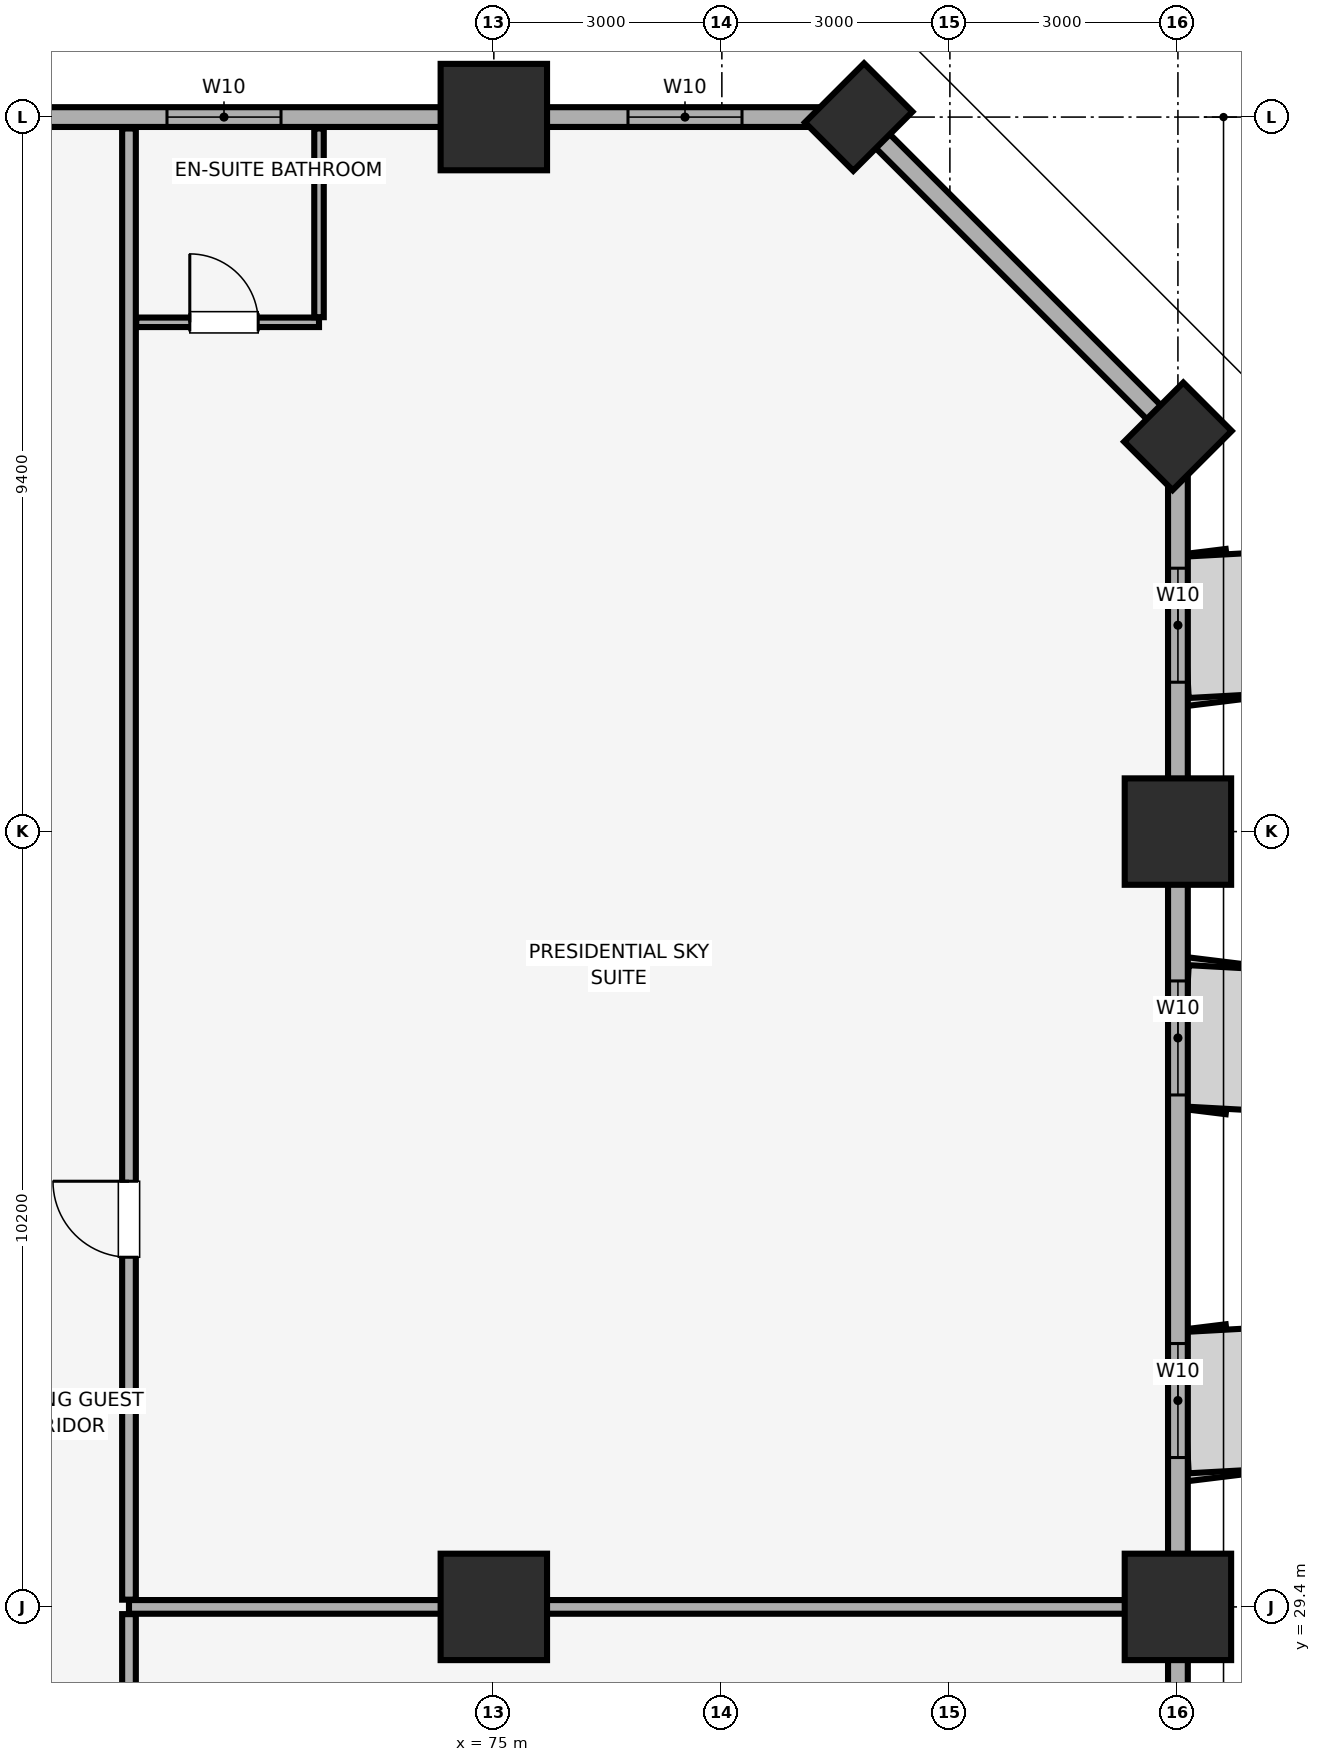
"""IFC4 building model, lengths in metres.
Left out: names, types, materials, properties, quantities, classifications, styles, units other than length and angle.
Written with IfcOpenShell. Run it as: python <this file> out.ifc"""

import sys

from ifc_helpers import new_model, si_unit, direction, frame, frame_2d, origin, origin_2d, place, context, subcontext, project, spatial, rectangle, extrude, element, fill, save


model = new_model("IFC4")
c1 = context("Model", 3, precision=1e-05, world=origin(), true_north=direction((0.0, 1.0)))
c2 = subcontext(c1, "Body", "Model", "MODEL_VIEW")
j1 = project(units=[si_unit("LENGTHUNIT", "METRE"), si_unit("PLANEANGLEUNIT", "RADIAN")], contexts=[c1])
p1 = place(None, origin())
s1 = spatial("IfcSite", under=j1, at=p1, CompositionType="ELEMENT")
p2 = place(p1, origin())
s2 = spatial("IfcBuilding", under=s1, at=p2, CompositionType="ELEMENT")
p3 = place(p2, frame((0.0, 0.0, 57.65)))
s3 = spatial("IfcBuildingStorey", under=s2, at=p3, CompositionType="ELEMENT", Elevation=57.65)
for number, where, z_axis, x_axis in (
    (1, (84.0, 29.4, 0.0), (0.0, 0.0, 1.0), (1.0, 0.0, 0.0)),
    (2, (84.0, 39.6, 0.0), (0.0, 0.0, 1.0), (1.0, 0.0, 0.0)),
):
    element("IfcColumn", number, at=place(p3, frame(where, z_axis=z_axis, x_axis=x_axis)), inside=s3, PredefinedType="COLUMN", context=c2, shape_type="SweptSolid", body=[
        extrude(rectangle(XDim=1.4, YDim=1.4, at=origin_2d()), origin(), (0.0, 0.0, 1.0), 3.51),
    ])
for number, where, z_axis, x_axis in (
    (3, (84.0, 44.8, 0.0), (0.0, 0.0, 1.0), (0.707, 0.707, 0.0)),
    (4, (79.8, 49.0, 0.0), (0.0, 0.0, 1.0), (0.707, 0.707, 0.0)),
):
    element("IfcColumn", number, at=place(p3, frame(where, z_axis=z_axis, x_axis=x_axis)), inside=s3, PredefinedType="PILASTER", context=c2, shape_type="SweptSolid", body=[
        extrude(rectangle(XDim=1.1, YDim=0.9, at=origin_2d()), origin(), (0.0, 0.0, 1.0), 3.51),
    ])
for number, where, z_axis, x_axis in (
    (5, (75.0, 29.4, 0.0), (0.0, 0.0, 1.0), (1.0, 0.0, 0.0)),
    (6, (75.0, 49.0, 0.0), (0.0, 0.0, 1.0), (1.0, 0.0, 0.0)),
):
    element("IfcColumn", number, at=place(p3, frame(where, z_axis=z_axis, x_axis=x_axis)), inside=s3, PredefinedType="COLUMN", context=c2, shape_type="SweptSolid", body=[
        extrude(rectangle(XDim=1.4, YDim=1.4, at=origin_2d()), origin(), (0.0, 0.0, 1.0), 3.51),
    ])
p4 = place(p3, frame((84.0, 4.2, 0.0), z_axis=(0.0, 0.0, 1.0), x_axis=(0.0, 1.0, 0.0)))
e7 = element("IfcWall", 7, at=p4, inside=s3, PredefinedType="SOLIDWALL", context=c2, shape_type="SweptSolid", body=[
    extrude(rectangle(XDim=40.6, YDim=0.26, at=frame_2d((20.3, 0.0))), origin(), (0.0, 0.0, 1.0), 2.56),
])
p5 = place(p4, frame((4.55, 0.0, 0.85)))
e8 = element("IfcOpeningElement", 8, at=p5, cuts=e7, PredefinedType="OPENING", context=c2, shape_type="SweptSolid", body=[
    extrude(rectangle(XDim=1.5, YDim=1.4, at=frame_2d((0.75, 0.7))), frame((0.0, 0.14, 0.0), z_axis=(0.0, -1.0, 0.0), x_axis=(1.0, 0.0, 0.0)), (0.0, 0.0, 1.0), 0.28),
])
p6 = place(p4, frame((13.46, 0.0, 0.85)))
e9 = element("IfcOpeningElement", 9, at=p6, cuts=e7, PredefinedType="OPENING", context=c2, shape_type="SweptSolid", body=[
    extrude(rectangle(XDim=1.5, YDim=1.4, at=frame_2d((0.75, 0.7))), frame((0.0, 0.14, 0.0), z_axis=(0.0, -1.0, 0.0), x_axis=(1.0, 0.0, 0.0)), (0.0, 0.0, 1.0), 0.28),
])
p7 = place(p4, frame((20.26, 0.0, 0.85)))
e10 = element("IfcOpeningElement", 10, at=p7, cuts=e7, PredefinedType="OPENING", context=c2, shape_type="SweptSolid", body=[
    extrude(rectangle(XDim=1.5, YDim=1.4, at=frame_2d((0.75, 0.7))), frame((0.0, 0.14, 0.0), z_axis=(0.0, -1.0, 0.0), x_axis=(1.0, 0.0, 0.0)), (0.0, 0.0, 1.0), 0.28),
])
p8 = place(p4, frame((27.165, 0.0, 0.85)))
e11 = element("IfcOpeningElement", 11, at=p8, cuts=e7, PredefinedType="OPENING", context=c2, shape_type="SweptSolid", body=[
    extrude(rectangle(XDim=1.5, YDim=1.4, at=frame_2d((0.75, 0.7))), frame((0.0, 0.14, 0.0), z_axis=(0.0, -1.0, 0.0), x_axis=(1.0, 0.0, 0.0)), (0.0, 0.0, 1.0), 0.28),
])
p9 = place(p4, frame((31.935, 0.0, 0.85)))
e12 = element("IfcOpeningElement", 12, at=p9, cuts=e7, PredefinedType="OPENING", context=c2, shape_type="SweptSolid", body=[
    extrude(rectangle(XDim=1.5, YDim=1.4, at=frame_2d((0.75, 0.7))), frame((0.0, 0.14, 0.0), z_axis=(0.0, -1.0, 0.0), x_axis=(1.0, 0.0, 0.0)), (0.0, 0.0, 1.0), 0.28),
])
p10 = place(p4, frame((37.365, 0.0, 0.85)))
e13 = element("IfcOpeningElement", 13, at=p10, cuts=e7, PredefinedType="OPENING", context=c2, shape_type="SweptSolid", body=[
    extrude(rectangle(XDim=1.5, YDim=1.4, at=frame_2d((0.75, 0.7))), frame((0.0, 0.14, 0.0), z_axis=(0.0, -1.0, 0.0), x_axis=(1.0, 0.0, 0.0)), (0.0, 0.0, 1.0), 0.28),
])
p11 = place(p3, frame((84.0, 44.8, 0.0), z_axis=(0.0, 0.0, 1.0), x_axis=(-0.707106781187, 0.707106781187, 0.0)))
e14 = element("IfcWall", 14, at=p11, inside=s3, PredefinedType="SOLIDWALL", context=c2, shape_type="SweptSolid", body=[
    extrude(rectangle(XDim=5.94, YDim=0.26, at=frame_2d((2.97, 0.0))), origin(), (0.0, 0.0, 1.0), 2.56),
])
p12 = place(p3, frame((79.8, 49.0, 0.0), z_axis=(0.0, 0.0, 1.0), x_axis=(-1.0, 0.0, 0.0)))
e15 = element("IfcWall", 15, at=p12, inside=s3, PredefinedType="SOLIDWALL", context=c2, shape_type="SweptSolid", body=[
    extrude(rectangle(XDim=75.6, YDim=0.26, at=frame_2d((37.8, 0.0))), origin(), (0.0, 0.0, 1.0), 2.56),
])
p13 = place(p12, frame((72.565, 0.0, 0.85)))
e16 = element("IfcOpeningElement", 16, at=p13, cuts=e15, PredefinedType="OPENING", context=c2, shape_type="SweptSolid", body=[
    extrude(rectangle(XDim=1.5, YDim=1.4, at=frame_2d((0.75, 0.7))), frame((0.0, 0.14, 0.0), z_axis=(0.0, -1.0, 0.0), x_axis=(1.0, 0.0, 0.0)), (0.0, 0.0, 1.0), 0.28),
])
p14 = place(p12, frame((67.45, 0.0, 0.85)))
e17 = element("IfcOpeningElement", 17, at=p14, cuts=e15, PredefinedType="OPENING", context=c2, shape_type="SweptSolid", body=[
    extrude(rectangle(XDim=1.5, YDim=1.4, at=frame_2d((0.75, 0.7))), frame((0.0, 0.14, 0.0), z_axis=(0.0, -1.0, 0.0), x_axis=(1.0, 0.0, 0.0)), (0.0, 0.0, 1.0), 0.28),
])
p15 = place(p12, frame((7.6, 0.0, 0.85)))
e18 = element("IfcOpeningElement", 18, at=p15, cuts=e15, PredefinedType="OPENING", context=c2, shape_type="SweptSolid", body=[
    extrude(rectangle(XDim=1.5, YDim=1.4, at=frame_2d((0.75, 0.7))), frame((0.0, 0.14, 0.0), z_axis=(0.0, -1.0, 0.0), x_axis=(1.0, 0.0, 0.0)), (0.0, 0.0, 1.0), 0.28),
])
p16 = place(p12, frame((1.535, 0.0, 0.85)))
e19 = element("IfcOpeningElement", 19, at=p16, cuts=e15, PredefinedType="OPENING", context=c2, shape_type="SweptSolid", body=[
    extrude(rectangle(XDim=1.5, YDim=1.4, at=frame_2d((0.75, 0.7))), frame((0.0, 0.14, 0.0), z_axis=(0.0, -1.0, 0.0), x_axis=(1.0, 0.0, 0.0)), (0.0, 0.0, 1.0), 0.28),
])
p17 = place(p12, frame((52.265, 0.0, 0.9)))
e20 = element("IfcOpeningElement", 20, at=p17, cuts=e15, PredefinedType="OPENING", context=c2, shape_type="SweptSolid", body=[
    extrude(rectangle(XDim=1.5, YDim=1.4, at=frame_2d((0.75, 0.7))), frame((0.0, 0.14, 0.0), z_axis=(0.0, -1.0, 0.0), x_axis=(1.0, 0.0, 0.0)), (0.0, 0.0, 1.0), 0.28),
])
p18 = place(p12, frame((45.5, 0.0, 0.9)))
e21 = element("IfcOpeningElement", 21, at=p18, cuts=e15, PredefinedType="OPENING", context=c2, shape_type="SweptSolid", body=[
    extrude(rectangle(XDim=1.5, YDim=1.4, at=frame_2d((0.75, 0.7))), frame((0.0, 0.14, 0.0), z_axis=(0.0, -1.0, 0.0), x_axis=(1.0, 0.0, 0.0)), (0.0, 0.0, 1.0), 0.28),
])
p19 = place(p12, frame((31.05, 0.0, 0.9)))
e22 = element("IfcOpeningElement", 22, at=p19, cuts=e15, PredefinedType="OPENING", context=c2, shape_type="SweptSolid", body=[
    extrude(rectangle(XDim=1.5, YDim=1.4, at=frame_2d((0.75, 0.7))), frame((0.0, 0.14, 0.0), z_axis=(0.0, -1.0, 0.0), x_axis=(1.0, 0.0, 0.0)), (0.0, 0.0, 1.0), 0.28),
])
p20 = place(p12, frame((27.85, 0.0, 0.9)))
e23 = element("IfcOpeningElement", 23, at=p20, cuts=e15, PredefinedType="OPENING", context=c2, shape_type="SweptSolid", body=[
    extrude(rectangle(XDim=1.5, YDim=1.4, at=frame_2d((0.75, 0.7))), frame((0.0, 0.14, 0.0), z_axis=(0.0, -1.0, 0.0), x_axis=(1.0, 0.0, 0.0)), (0.0, 0.0, 1.0), 0.28),
])
p21 = place(p12, frame((23.485, 0.0, 0.9)))
e24 = element("IfcOpeningElement", 24, at=p21, cuts=e15, PredefinedType="OPENING", context=c2, shape_type="SweptSolid", body=[
    extrude(rectangle(XDim=1.5, YDim=1.4, at=frame_2d((0.75, 0.7))), frame((0.0, 0.14, 0.0), z_axis=(0.0, -1.0, 0.0), x_axis=(1.0, 0.0, 0.0)), (0.0, 0.0, 1.0), 0.28),
])
p22 = place(p3, frame((70.2, 29.4, 0.0), z_axis=(0.0, 0.0, 1.0), x_axis=(1.0, 0.0, 0.0)))
e25 = element("IfcWall", 25, at=p22, inside=s3, PredefinedType="PARTITIONING", context=c2, shape_type="SweptSolid", body=[
    extrude(rectangle(XDim=13.65, YDim=0.18, at=frame_2d((6.825, 0.0))), origin(), (0.0, 0.0, 1.0), 2.86),
])
p23 = place(p3, frame((70.2, 21.515, 0.0), z_axis=(0.0, 0.0, 1.0), x_axis=(0.0, 1.0, 0.0)))
e26 = element("IfcWall", 26, at=p23, inside=s3, PredefinedType="PARTITIONING", context=c2, shape_type="SweptSolid", body=[
    extrude(rectangle(XDim=7.79, YDim=0.18, at=frame_2d((3.895, 0.0))), origin(), (0.0, 0.0, 1.0), 3.51),
])
p24 = place(p23, frame((4.49, 0.0, 0.0)))
e27 = element("IfcOpeningElement", 27, at=p24, cuts=e26, PredefinedType="OPENING", context=c2, shape_type="SweptSolid", body=[
    extrude(rectangle(XDim=1.0, YDim=2.15, at=frame_2d((0.5, 1.075))), frame((0.0, 0.1, 0.0), z_axis=(0.0, -1.0, 0.0), x_axis=(1.0, 0.0, 0.0)), (0.0, 0.0, 1.0), 0.2),
])
p25 = place(p3, frame((70.2, 29.495, 0.0), z_axis=(0.0, 0.0, 1.0), x_axis=(0.0, 1.0, 0.0)))
e28 = element("IfcWall", 28, at=p25, inside=s3, PredefinedType="PARTITIONING", context=c2, shape_type="SweptSolid", body=[
    extrude(rectangle(XDim=19.355, YDim=0.18, at=frame_2d((9.677, 0.0))), origin(), (0.0, 0.0, 1.0), 3.51),
])
p26 = place(p25, frame((4.505, 0.0, 0.0)))
e29 = element("IfcOpeningElement", 29, at=p26, cuts=e28, PredefinedType="OPENING", context=c2, shape_type="SweptSolid", body=[
    extrude(rectangle(XDim=1.0, YDim=2.15, at=frame_2d((0.5, 1.075))), frame((0.0, 0.1, 0.0), z_axis=(0.0, -1.0, 0.0), x_axis=(1.0, 0.0, 0.0)), (0.0, 0.0, 1.0), 0.2),
])
p27 = place(p3, frame((70.295, 46.3, 0.0), z_axis=(0.0, 0.0, 1.0), x_axis=(1.0, 0.0, 0.0)))
e30 = element("IfcWall", 30, at=p27, inside=s3, PredefinedType="PARTITIONING", context=c2, shape_type="SweptSolid", body=[
    extrude(rectangle(XDim=2.405, YDim=0.125, at=frame_2d((1.203, 0.0))), origin(), (0.0, 0.0, 1.0), 3.51),
])
p28 = place(p27, frame((0.705, 0.0, 0.0)))
e31 = element("IfcOpeningElement", 31, at=p28, cuts=e30, PredefinedType="OPENING", context=c2, shape_type="SweptSolid", body=[
    extrude(rectangle(XDim=0.9, YDim=2.1, at=frame_2d((0.45, 1.05))), frame((0.0, 0.073, 0.0), z_axis=(0.0, -1.0, 0.0), x_axis=(1.0, 0.0, 0.0)), (0.0, 0.0, 1.0), 0.145),
])
p29 = place(p3, frame((72.7, 46.367, 0.0), z_axis=(0.0, 0.0, 1.0), x_axis=(0.0, 1.0, 0.0)))
e32 = element("IfcWall", 32, at=p29, inside=s3, PredefinedType="PARTITIONING", context=c2, shape_type="SweptSolid", body=[
    extrude(rectangle(XDim=2.483, YDim=0.125, at=frame_2d((1.241, 0.0))), origin(), (0.0, 0.0, 1.0), 3.51),
])
p30 = place(p8, origin())
e33 = element("IfcWindow", 33, at=p30, inside=s3, PartitioningType="SINGLE_PANEL", PredefinedType="WINDOW", context=c2, shape_type="SweptSolid", body=[
    extrude(rectangle(XDim=1.5, YDim=1.4, at=frame_2d((0.75, 0.7))), frame((0.0, 0.03, 0.0), z_axis=(0.0, -1.0, 0.0), x_axis=(1.0, 0.0, 0.0)), (0.0, 0.0, 1.0), 0.06),
])
fill(e11, e33)
p31 = place(p9, origin())
e34 = element("IfcWindow", 34, at=p31, inside=s3, PartitioningType="SINGLE_PANEL", PredefinedType="WINDOW", context=c2, shape_type="SweptSolid", body=[
    extrude(rectangle(XDim=1.5, YDim=1.4, at=frame_2d((0.75, 0.7))), frame((0.0, 0.03, 0.0), z_axis=(0.0, -1.0, 0.0), x_axis=(1.0, 0.0, 0.0)), (0.0, 0.0, 1.0), 0.06),
])
fill(e12, e34)
p32 = place(p10, origin())
e35 = element("IfcWindow", 35, at=p32, inside=s3, PartitioningType="SINGLE_PANEL", PredefinedType="WINDOW", context=c2, shape_type="SweptSolid", body=[
    extrude(rectangle(XDim=1.5, YDim=1.4, at=frame_2d((0.75, 0.7))), frame((0.0, 0.03, 0.0), z_axis=(0.0, -1.0, 0.0), x_axis=(1.0, 0.0, 0.0)), (0.0, 0.0, 1.0), 0.06),
])
fill(e13, e35)
p33 = place(p15, origin())
e36 = element("IfcWindow", 36, at=p33, inside=s3, PartitioningType="SINGLE_PANEL", PredefinedType="WINDOW", context=c2, shape_type="SweptSolid", body=[
    extrude(rectangle(XDim=1.5, YDim=1.4, at=frame_2d((0.75, 0.7))), frame((0.0, 0.03, 0.0), z_axis=(0.0, -1.0, 0.0), x_axis=(1.0, 0.0, 0.0)), (0.0, 0.0, 1.0), 0.06),
])
fill(e18, e36)
p34 = place(p16, origin())
e37 = element("IfcWindow", 37, at=p34, inside=s3, PartitioningType="SINGLE_PANEL", PredefinedType="WINDOW", context=c2, shape_type="SweptSolid", body=[
    extrude(rectangle(XDim=1.5, YDim=1.4, at=frame_2d((0.75, 0.7))), frame((0.0, 0.03, 0.0), z_axis=(0.0, -1.0, 0.0), x_axis=(1.0, 0.0, 0.0)), (0.0, 0.0, 1.0), 0.06),
])
fill(e19, e37)
p35 = place(p26, origin())
e38 = element("IfcDoor", 38, at=p35, inside=s3, OperationType="SINGLE_SWING_RIGHT", PredefinedType="DOOR", context=c2, shape_type="SweptSolid", body=[
    extrude(rectangle(XDim=1.0, YDim=2.15, at=frame_2d((0.5, 1.075))), frame((0.0, 0.025, 0.0), z_axis=(0.0, -1.0, 0.0), x_axis=(1.0, 0.0, 0.0)), (0.0, 0.0, 1.0), 0.05),
])
fill(e29, e38)
p36 = place(p28, origin())
e39 = element("IfcDoor", 39, at=p36, inside=s3, OperationType="SINGLE_SWING_LEFT", PredefinedType="DOOR", context=c2, shape_type="SweptSolid", body=[
    extrude(rectangle(XDim=0.9, YDim=2.1, at=frame_2d((0.45, 1.05))), frame((0.0, 0.025, 0.0), z_axis=(0.0, -1.0, 0.0), x_axis=(1.0, 0.0, 0.0)), (0.0, 0.0, 1.0), 0.05),
])
fill(e31, e39)
save(model, sys.argv[1])
